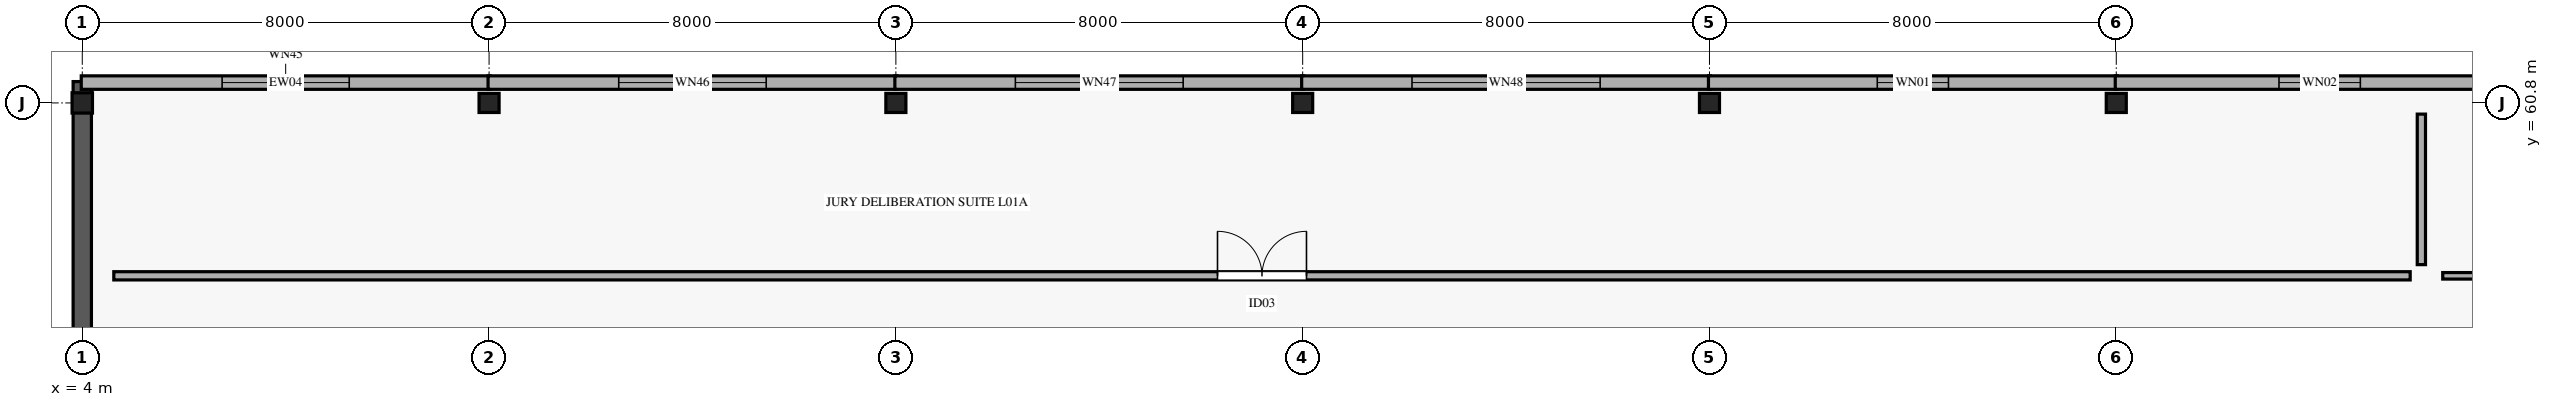
"""IFC4 building model, lengths in metres.
Left out: names, types, materials, properties, quantities, classifications, styles, units other than length and angle.
Written with IfcOpenShell. Run it as: python <this file> out.ifc"""

import sys

from ifc_helpers import new_model, si_unit, direction, frame, frame_2d, origin, origin_2d, place, context, subcontext, project, spatial, rectangle, i_section, extrude, element, fill, save


model = new_model("IFC4")
c1 = context("Model", 3, precision=1e-05, world=origin(), true_north=direction((0.0, 1.0)))
c2 = subcontext(c1, "Body", "Model", "MODEL_VIEW")
j1 = project(units=[si_unit("LENGTHUNIT", "METRE"), si_unit("PLANEANGLEUNIT", "RADIAN")], contexts=[c1])
p1 = place(None, origin())
s1 = spatial("IfcSite", under=j1, at=p1, CompositionType="ELEMENT")
p2 = place(p1, origin())
s2 = spatial("IfcBuilding", under=s1, at=p2, CompositionType="ELEMENT")
p3 = place(p2, frame((0.0, 0.0, 5.4)))
s3 = spatial("IfcBuildingStorey", under=s2, at=p3, CompositionType="ELEMENT", Elevation=5.4)
p4 = place(p3, frame((4.0, 60.8, 0.0), z_axis=(0.0, 0.0, 1.0), x_axis=(1.0, 0.0, 0.0)))
e1 = element("IfcColumn", 1, at=p4, inside=s3, PredefinedType="COLUMN", context=c2, shape_type="SweptSolid", body=[
    extrude(i_section(OverallWidth=0.401, OverallDepth=0.399, WebThickness=0.025, FlangeThickness=0.04, FilletRadius=0.015, at=origin_2d()), origin(), (0.0, 0.0, 1.0), 5.185),
])
for number, where, z_axis, x_axis in (
    (2, (12.0, 60.8, 0.0), (0.0, 0.0, 1.0), (1.0, 0.0, 0.0)),
    (3, (20.0, 60.8, 0.0), (0.0, 0.0, 1.0), (1.0, 0.0, 0.0)),
    (4, (28.0, 60.8, 0.0), (0.0, 0.0, 1.0), (1.0, 0.0, 0.0)),
    (5, (36.0, 60.8, 0.0), (0.0, 0.0, 1.0), (1.0, 0.0, 0.0)),
    (6, (44.0, 60.8, 0.0), (0.0, 0.0, 1.0), (1.0, 0.0, 0.0)),
):
    element("IfcColumn", number, at=place(p3, frame(where, z_axis=z_axis, x_axis=x_axis)), inside=s3, PredefinedType="COLUMN", context=c2, shape_type="SweptSolid", body=[
        extrude(i_section(OverallWidth=0.394, OverallDepth=0.376, WebThickness=0.017, FlangeThickness=0.028, FilletRadius=0.015, at=origin_2d()), origin(), (0.0, 0.0, 1.0), 5.185),
    ])
p5 = place(p3, frame((4.0, 53.18, 0.0), z_axis=(0.0, 0.0, 1.0), x_axis=(0.0, 1.0, 0.0)))
e7 = element("IfcWall", 7, at=p5, inside=s3, PredefinedType="STANDARD", context=c2, shape_type="SweptSolid", body=[
    extrude(rectangle(XDim=8.04, YDim=0.36, at=frame_2d((4.02, 0.0))), origin(), (0.0, 0.0, 1.0), 5.19),
])
p6 = place(p3, frame((3.98, 61.2, 0.0), z_axis=(0.0, 0.0, 1.0), x_axis=(1.0, 0.0, 0.0)))
e8 = element("IfcWall", 8, at=p6, inside=s3, PredefinedType="STANDARD", context=c2, shape_type="SweptSolid", body=[
    extrude(rectangle(XDim=8.04, YDim=0.265, at=frame_2d((4.02, 0.0))), origin(), (0.0, 0.0, 1.0), 4.25),
])
p7 = place(p6, frame((2.77, 0.0, 0.75)))
e9 = element("IfcOpeningElement", 9, at=p7, cuts=e8, PredefinedType="OPENING", context=c2, shape_type="SweptSolid", body=[
    extrude(rectangle(XDim=2.5, YDim=1.65, at=frame_2d((1.25, 0.825))), frame((0.0, 0.142, 0.0), z_axis=(0.0, -1.0, 0.0), x_axis=(1.0, 0.0, 0.0)), (0.0, 0.0, 1.0), 0.285),
])
p8 = place(p3, frame((11.98, 61.2, 0.0), z_axis=(0.0, 0.0, 1.0), x_axis=(1.0, 0.0, 0.0)))
e10 = element("IfcWall", 10, at=p8, inside=s3, PredefinedType="STANDARD", context=c2, shape_type="SweptSolid", body=[
    extrude(rectangle(XDim=8.04, YDim=0.265, at=frame_2d((4.02, 0.0))), origin(), (0.0, 0.0, 1.0), 4.25),
])
p9 = place(p8, frame((2.57, 0.0, 0.75)))
e11 = element("IfcOpeningElement", 11, at=p9, cuts=e10, PredefinedType="OPENING", context=c2, shape_type="SweptSolid", body=[
    extrude(rectangle(XDim=2.9, YDim=1.65, at=frame_2d((1.45, 0.825))), frame((0.0, 0.142, 0.0), z_axis=(0.0, -1.0, 0.0), x_axis=(1.0, 0.0, 0.0)), (0.0, 0.0, 1.0), 0.285),
])
p10 = place(p3, frame((19.98, 61.2, 0.0), z_axis=(0.0, 0.0, 1.0), x_axis=(1.0, 0.0, 0.0)))
e12 = element("IfcWall", 12, at=p10, inside=s3, PredefinedType="STANDARD", context=c2, shape_type="SweptSolid", body=[
    extrude(rectangle(XDim=8.04, YDim=0.265, at=frame_2d((4.02, 0.0))), origin(), (0.0, 0.0, 1.0), 4.25),
])
p11 = place(p10, frame((2.37, 0.0, 0.75)))
e13 = element("IfcOpeningElement", 13, at=p11, cuts=e12, PredefinedType="OPENING", context=c2, shape_type="SweptSolid", body=[
    extrude(rectangle(XDim=3.3, YDim=1.65, at=frame_2d((1.65, 0.825))), frame((0.0, 0.142, 0.0), z_axis=(0.0, -1.0, 0.0), x_axis=(1.0, 0.0, 0.0)), (0.0, 0.0, 1.0), 0.285),
])
p12 = place(p3, frame((27.98, 61.2, 0.0), z_axis=(0.0, 0.0, 1.0), x_axis=(1.0, 0.0, 0.0)))
e14 = element("IfcWall", 14, at=p12, inside=s3, PredefinedType="STANDARD", context=c2, shape_type="SweptSolid", body=[
    extrude(rectangle(XDim=8.04, YDim=0.265, at=frame_2d((4.02, 0.0))), origin(), (0.0, 0.0, 1.0), 4.25),
])
p13 = place(p12, frame((2.17, 0.0, 0.75)))
e15 = element("IfcOpeningElement", 15, at=p13, cuts=e14, PredefinedType="OPENING", context=c2, shape_type="SweptSolid", body=[
    extrude(rectangle(XDim=3.7, YDim=1.65, at=frame_2d((1.85, 0.825))), frame((0.0, 0.142, 0.0), z_axis=(0.0, -1.0, 0.0), x_axis=(1.0, 0.0, 0.0)), (0.0, 0.0, 1.0), 0.285),
])
p14 = place(p3, frame((35.98, 61.2, 0.0), z_axis=(0.0, 0.0, 1.0), x_axis=(1.0, 0.0, 0.0)))
e16 = element("IfcWall", 16, at=p14, inside=s3, PredefinedType="STANDARD", context=c2, shape_type="SweptSolid", body=[
    extrude(rectangle(XDim=8.04, YDim=0.265, at=frame_2d((4.02, 0.0))), origin(), (0.0, 0.0, 1.0), 4.25),
])
p15 = place(p14, frame((3.32, 0.0, 0.75)))
e17 = element("IfcOpeningElement", 17, at=p15, cuts=e16, PredefinedType="OPENING", context=c2, shape_type="SweptSolid", body=[
    extrude(rectangle(XDim=1.4, YDim=2.0, at=frame_2d((0.7, 1.0))), frame((0.0, 0.142, 0.0), z_axis=(0.0, -1.0, 0.0), x_axis=(1.0, 0.0, 0.0)), (0.0, 0.0, 1.0), 0.285),
])
p16 = place(p3, frame((43.98, 61.2, 0.0), z_axis=(0.0, 0.0, 1.0), x_axis=(1.0, 0.0, 0.0)))
e18 = element("IfcWall", 18, at=p16, inside=s3, PredefinedType="STANDARD", context=c2, shape_type="SweptSolid", body=[
    extrude(rectangle(XDim=8.04, YDim=0.265, at=frame_2d((4.02, 0.0))), origin(), (0.0, 0.0, 1.0), 4.25),
])
p17 = place(p16, frame((3.22, 0.0, 0.75)))
e19 = element("IfcOpeningElement", 19, at=p17, cuts=e18, PredefinedType="OPENING", context=c2, shape_type="SweptSolid", body=[
    extrude(rectangle(XDim=1.6, YDim=2.0, at=frame_2d((0.8, 1.0))), frame((0.0, 0.142, 0.0), z_axis=(0.0, -1.0, 0.0), x_axis=(1.0, 0.0, 0.0)), (0.0, 0.0, 1.0), 0.285),
])
p18 = place(p3, frame((4.62, 57.4, 0.0), z_axis=(0.0, 0.0, 1.0), x_axis=(1.0, 0.0, 0.0)))
e20 = element("IfcWall", 20, at=p18, inside=s3, PredefinedType="PARTITIONING", context=c2, shape_type="SweptSolid", body=[
    extrude(rectangle(XDim=45.16, YDim=0.162, at=frame_2d((22.58, 0.0))), origin(), (0.0, 0.0, 1.0), 4.05),
])
p19 = place(p18, frame((21.705, 0.0, 0.0)))
e21 = element("IfcOpeningElement", 21, at=p19, cuts=e20, PredefinedType="OPENING", context=c2, shape_type="SweptSolid", body=[
    extrude(rectangle(XDim=1.75, YDim=2.35, at=frame_2d((0.875, 1.175))), frame((0.0, 0.091, 0.0), z_axis=(0.0, -1.0, 0.0), x_axis=(1.0, 0.0, 0.0)), (0.0, 0.0, 1.0), 0.182),
])
p20 = place(p3, frame((50.0, 57.62, 0.0), z_axis=(0.0, 0.0, 1.0), x_axis=(0.0, 1.0, 0.0)))
e22 = element("IfcWall", 22, at=p20, inside=s3, PredefinedType="PARTITIONING", context=c2, shape_type="SweptSolid", body=[
    extrude(rectangle(XDim=2.96, YDim=0.162, at=frame_2d((1.48, 0.0))), origin(), (0.0, 0.0, 1.0), 4.05),
])
p21 = place(p3, frame((50.42, 57.4, 0.0), z_axis=(0.0, 0.0, 1.0), x_axis=(1.0, 0.0, 0.0)))
e23 = element("IfcWall", 23, at=p21, inside=s3, PredefinedType="PARTITIONING", context=c2, shape_type="SweptSolid", body=[
    extrude(rectangle(XDim=16.96, YDim=0.128, at=frame_2d((8.48, 0.0))), origin(), (0.0, 0.0, 1.0), 4.05),
])
p22 = place(p21, frame((7.68, 0.0, 0.0)))
e24 = element("IfcOpeningElement", 24, at=p22, cuts=e23, PredefinedType="OPENING", context=c2, shape_type="SweptSolid", body=[
    extrude(rectangle(XDim=1.6, YDim=2.35, at=frame_2d((0.8, 1.175))), frame((0.0, 0.074, 0.0), z_axis=(0.0, -1.0, 0.0), x_axis=(1.0, 0.0, 0.0)), (0.0, 0.0, 1.0), 0.148),
])
p23 = place(p7, origin())
e25 = element("IfcWindow", 25, at=p23, inside=s3, PartitioningType="SINGLE_PANEL", PredefinedType="WINDOW", context=c2, shape_type="SweptSolid", body=[
    extrude(rectangle(XDim=2.5, YDim=1.65, at=frame_2d((1.25, 0.825))), frame((0.0, 0.03, 0.0), z_axis=(0.0, -1.0, 0.0), x_axis=(1.0, 0.0, 0.0)), (0.0, 0.0, 1.0), 0.06),
])
fill(e9, e25)
p24 = place(p9, origin())
e26 = element("IfcWindow", 26, at=p24, inside=s3, PartitioningType="SINGLE_PANEL", PredefinedType="WINDOW", context=c2, shape_type="SweptSolid", body=[
    extrude(rectangle(XDim=2.9, YDim=1.65, at=frame_2d((1.45, 0.825))), frame((0.0, 0.03, 0.0), z_axis=(0.0, -1.0, 0.0), x_axis=(1.0, 0.0, 0.0)), (0.0, 0.0, 1.0), 0.06),
])
fill(e11, e26)
p25 = place(p11, origin())
e27 = element("IfcWindow", 27, at=p25, inside=s3, PartitioningType="SINGLE_PANEL", PredefinedType="WINDOW", context=c2, shape_type="SweptSolid", body=[
    extrude(rectangle(XDim=3.3, YDim=1.65, at=frame_2d((1.65, 0.825))), frame((0.0, 0.03, 0.0), z_axis=(0.0, -1.0, 0.0), x_axis=(1.0, 0.0, 0.0)), (0.0, 0.0, 1.0), 0.06),
])
fill(e13, e27)
p26 = place(p13, origin())
e28 = element("IfcWindow", 28, at=p26, inside=s3, PartitioningType="SINGLE_PANEL", PredefinedType="WINDOW", context=c2, shape_type="SweptSolid", body=[
    extrude(rectangle(XDim=3.7, YDim=1.65, at=frame_2d((1.85, 0.825))), frame((0.0, 0.03, 0.0), z_axis=(0.0, -1.0, 0.0), x_axis=(1.0, 0.0, 0.0)), (0.0, 0.0, 1.0), 0.06),
])
fill(e15, e28)
p27 = place(p15, origin())
e29 = element("IfcWindow", 29, at=p27, inside=s3, PartitioningType="SINGLE_PANEL", PredefinedType="WINDOW", context=c2, shape_type="SweptSolid", body=[
    extrude(rectangle(XDim=1.4, YDim=2.0, at=frame_2d((0.7, 1.0))), frame((0.0, 0.03, 0.0), z_axis=(0.0, -1.0, 0.0), x_axis=(1.0, 0.0, 0.0)), (0.0, 0.0, 1.0), 0.06),
])
fill(e17, e29)
p28 = place(p17, origin())
e30 = element("IfcWindow", 30, at=p28, inside=s3, PartitioningType="SINGLE_PANEL", PredefinedType="WINDOW", context=c2, shape_type="SweptSolid", body=[
    extrude(rectangle(XDim=1.6, YDim=2.0, at=frame_2d((0.8, 1.0))), frame((0.0, 0.03, 0.0), z_axis=(0.0, -1.0, 0.0), x_axis=(1.0, 0.0, 0.0)), (0.0, 0.0, 1.0), 0.06),
])
fill(e19, e30)
p29 = place(p19, origin())
e31 = element("IfcDoor", 31, at=p29, inside=s3, OperationType="DOUBLE_DOOR_SINGLE_SWING", PredefinedType="DOOR", context=c2, shape_type="SweptSolid", body=[
    extrude(rectangle(XDim=1.75, YDim=2.35, at=frame_2d((0.875, 1.175))), frame((0.0, 0.025, 0.0), z_axis=(0.0, -1.0, 0.0), x_axis=(1.0, 0.0, 0.0)), (0.0, 0.0, 1.0), 0.05),
])
fill(e21, e31)
save(model, sys.argv[1])
